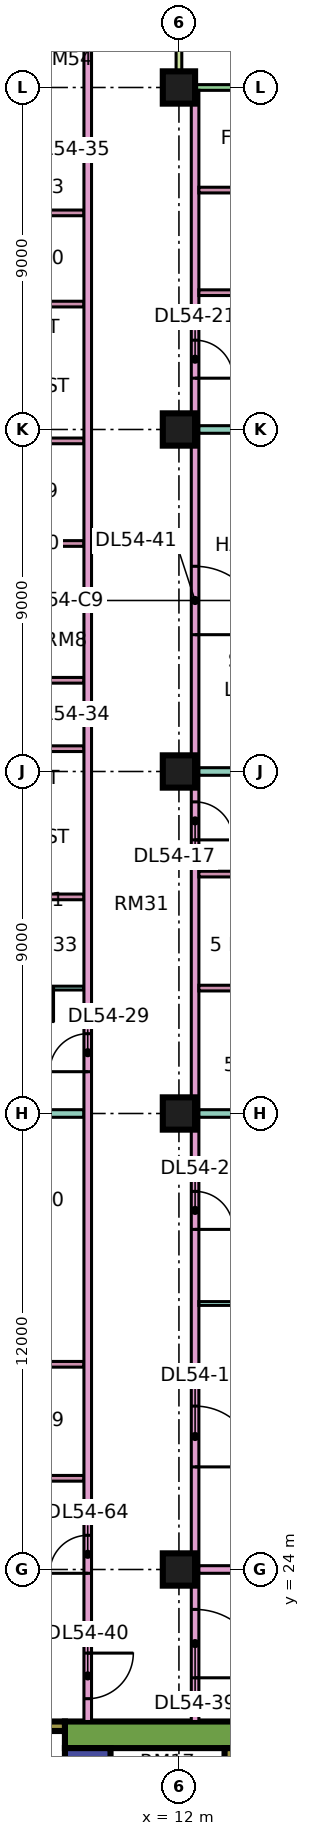
"""IFC4 building model, lengths in metres.
Left out: names, types, materials, properties, quantities, classifications, styles, units other than length and angle.
Written with IfcOpenShell. Run it as: python <this file> out.ifc"""

import sys

from ifc_helpers import new_model, si_unit, direction, frame, frame_2d, origin, origin_2d, place, context, subcontext, project, spatial, rectangle, extrude, element, fill, save


model = new_model("IFC4")
c1 = context("Model", 3, precision=1e-05, world=origin(), true_north=direction((0.0, 1.0)))
c2 = subcontext(c1, "Body", "Model", "MODEL_VIEW")
j1 = project(units=[si_unit("LENGTHUNIT", "METRE"), si_unit("PLANEANGLEUNIT", "RADIAN")], contexts=[c1])
p1 = place(None, origin())
s1 = spatial("IfcSite", under=j1, at=p1, CompositionType="ELEMENT")
p2 = place(p1, origin())
s2 = spatial("IfcBuilding", under=s1, at=p2, CompositionType="ELEMENT")
p3 = place(p2, frame((0.0, 0.0, 230.4)))
s3 = spatial("IfcBuildingStorey", under=s2, at=p3, CompositionType="ELEMENT", Elevation=230.4)
for number, where, z_axis, x_axis in (
    (1, (12.0, 24.0, 0.0), (0.0, 0.0, 1.0), (1.0, 0.0, 0.0)),
    (2, (12.0, 36.0, 0.0), (0.0, 0.0, 1.0), (1.0, 0.0, 0.0)),
    (3, (12.0, 45.0, 0.0), (0.0, 0.0, 1.0), (1.0, 0.0, 0.0)),
    (4, (12.0, 54.0, 0.0), (0.0, 0.0, 1.0), (1.0, 0.0, 0.0)),
    (5, (12.0, 63.0, 0.0), (0.0, 0.0, 1.0), (1.0, 0.0, 0.0)),
):
    element("IfcColumn", number, at=place(p3, frame(where, z_axis=z_axis, x_axis=x_axis)), inside=s3, PredefinedType="COLUMN", context=c2, shape_type="SweptSolid", body=[
        extrude(rectangle(XDim=0.85, YDim=0.85, at=origin_2d()), origin(), (0.0, 0.0, 1.0), 3.75),
    ])
p4 = place(p3, frame((9.0, 19.65, 0.0), z_axis=(0.0, 0.0, 1.0), x_axis=(1.0, 0.0, 0.0)))
e6 = element("IfcWall", 6, at=p4, inside=s3, PredefinedType="SHEAR", context=c2, shape_type="SweptSolid", body=[
    extrude(rectangle(XDim=25.0, YDim=0.7, at=frame_2d((12.5, 0.0))), origin(), (0.0, 0.0, 1.0), 3.75),
])
p5 = place(p4, frame((19.1, 0.0, 0.0)))
e7 = element("IfcOpeningElement", 7, at=p5, cuts=e6, PredefinedType="OPENING", context=c2, shape_type="SweptSolid", body=[
    extrude(rectangle(XDim=1.8, YDim=2.4, at=frame_2d((0.9, 1.2))), frame((0.0, 0.36, 0.0), z_axis=(0.0, -1.0, 0.0), x_axis=(1.0, 0.0, 0.0)), (0.0, 0.0, 1.0), 0.72),
])
p6 = place(p3, frame((9.6, 7.7, 0.0), z_axis=(0.0, 0.0, 1.0), x_axis=(0.0, 1.0, 0.0)))
e8 = element("IfcWall", 8, at=p6, inside=s3, PredefinedType="SHEAR", context=c2, shape_type="SweptSolid", body=[
    extrude(rectangle(XDim=11.6, YDim=1.2, at=frame_2d((5.8, 0.0))), origin(), (0.0, 0.0, 1.0), 3.75),
])
p7 = place(p6, frame((4.175, 0.0, 0.0)))
e9 = element("IfcOpeningElement", 9, at=p7, cuts=e8, PredefinedType="OPENING", context=c2, shape_type="SweptSolid", body=[
    extrude(rectangle(XDim=1.1, YDim=2.2, at=frame_2d((0.55, 1.1))), frame((0.0, 0.61, 0.0), z_axis=(0.0, -1.0, 0.0), x_axis=(1.0, 0.0, 0.0)), (0.0, 0.0, 1.0), 1.22),
])
p8 = place(p6, frame((6.675, 0.0, 0.0)))
e10 = element("IfcOpeningElement", 10, at=p8, cuts=e8, PredefinedType="OPENING", context=c2, shape_type="SweptSolid", body=[
    extrude(rectangle(XDim=1.1, YDim=2.2, at=frame_2d((0.55, 1.1))), frame((0.0, 0.61, 0.0), z_axis=(0.0, -1.0, 0.0), x_axis=(1.0, 0.0, 0.0)), (0.0, 0.0, 1.0), 1.22),
])
p9 = place(p6, frame((9.55, 0.0, 0.0)))
e11 = element("IfcOpeningElement", 11, at=p9, cuts=e8, PredefinedType="OPENING", context=c2, shape_type="SweptSolid", body=[
    extrude(rectangle(XDim=1.1, YDim=2.2, at=frame_2d((0.55, 1.1))), frame((0.0, 0.61, 0.0), z_axis=(0.0, -1.0, 0.0), x_axis=(1.0, 0.0, 0.0)), (0.0, 0.0, 1.0), 1.22),
])
p10 = place(p6, frame((1.85, 0.0, 0.0)))
e12 = element("IfcOpeningElement", 12, at=p10, cuts=e8, PredefinedType="OPENING", context=c2, shape_type="SweptSolid", body=[
    extrude(rectangle(XDim=0.9, YDim=2.1, at=frame_2d((0.45, 1.05))), frame((0.0, 0.61, 0.0), z_axis=(0.0, -1.0, 0.0), x_axis=(1.0, 0.0, 0.0)), (0.0, 0.0, 1.0), 1.22),
])
p11 = place(p3, frame((13.325, 7.7, 0.0), z_axis=(0.0, 0.0, 1.0), x_axis=(0.0, 1.0, 0.0)))
e13 = element("IfcWall", 13, at=p11, inside=s3, PredefinedType="SHEAR", context=c2, shape_type="SweptSolid", body=[
    extrude(rectangle(XDim=11.6, YDim=0.25, at=frame_2d((5.8, 0.0))), origin(), (0.0, 0.0, 1.0), 3.75),
])
p12 = place(p3, frame((2.1, 19.875, 0.0), z_axis=(0.0, 0.0, 1.0), x_axis=(1.0, 0.0, 0.0)))
e14 = element("IfcWall", 14, at=p12, inside=s3, PredefinedType="SHEAR", context=c2, shape_type="SweptSolid", body=[
    extrude(rectangle(XDim=6.9, YDim=0.25, at=frame_2d((3.45, 0.0))), origin(), (0.0, 0.0, 1.0), 3.75),
])
p13 = place(p12, frame((1.175, 0.0, 0.0)))
e15 = element("IfcOpeningElement", 15, at=p13, cuts=e14, PredefinedType="OPENING", context=c2, shape_type="SweptSolid", body=[
    extrude(rectangle(XDim=1.1, YDim=2.2, at=frame_2d((0.55, 1.1))), frame((0.0, 0.135, 0.0), z_axis=(0.0, -1.0, 0.0), x_axis=(1.0, 0.0, 0.0)), (0.0, 0.0, 1.0), 0.27),
])
p14 = place(p12, frame((4.6, 0.0, 0.0)))
e16 = element("IfcOpeningElement", 16, at=p14, cuts=e14, PredefinedType="OPENING", context=c2, shape_type="SweptSolid", body=[
    extrude(rectangle(XDim=1.2, YDim=2.2, at=frame_2d((0.6, 1.1))), frame((0.0, 0.135, 0.0), z_axis=(0.0, -1.0, 0.0), x_axis=(1.0, 0.0, 0.0)), (0.0, 0.0, 1.0), 0.27),
])
p15 = place(p3, frame((22.425, 63.0, 0.0), z_axis=(0.0, 0.0, 1.0), x_axis=(-1.0, 0.0, 0.0)))
e17 = element("IfcWall", 17, at=p15, inside=s3, PredefinedType="SOLIDWALL", context=c2, shape_type="SweptSolid", body=[
    extrude(rectangle(XDim=10.35, YDim=0.15, at=frame_2d((5.175, 0.0))), origin(), (0.0, 0.0, 1.0), 3.35),
])
p16 = place(p15, frame((1.4, 0.0, 0.0)))
e18 = element("IfcOpeningElement", 18, at=p16, cuts=e17, PredefinedType="OPENING", context=c2, shape_type="SweptSolid", body=[
    extrude(rectangle(XDim=1.8, YDim=2.4, at=frame_2d((0.9, 1.2))), frame((0.0, 0.085, 0.0), z_axis=(0.0, -1.0, 0.0), x_axis=(1.0, 0.0, 0.0)), (0.0, 0.0, 1.0), 0.17),
])
p17 = place(p15, frame((5.75, 0.0, 0.45)))
e19 = element("IfcOpeningElement", 19, at=p17, cuts=e17, PredefinedType="OPENING", context=c2, shape_type="SweptSolid", body=[
    extrude(rectangle(XDim=3.0, YDim=2.4, at=frame_2d((1.5, 1.2))), frame((0.0, 0.085, 0.0), z_axis=(0.0, -1.0, 0.0), x_axis=(1.0, 0.0, 0.0)), (0.0, 0.0, 1.0), 0.17),
])
p18 = place(p3, frame((12.0, 64.5, 0.0), z_axis=(0.0, 0.0, 1.0), x_axis=(0.0, -1.0, 0.0)))
e20 = element("IfcWall", 20, at=p18, inside=s3, PredefinedType="SOLIDWALL", context=c2, shape_type="SweptSolid", body=[
    extrude(rectangle(XDim=1.5, YDim=0.15, at=frame_2d((0.75, 0.0))), origin(), (0.0, 0.0, 1.0), 3.35),
])
p19 = place(p3, frame((0.0, 36.0, 0.0), z_axis=(0.0, 0.0, 1.0), x_axis=(1.0, 0.0, 0.0)))
e21 = element("IfcWall", 21, at=p19, inside=s3, PredefinedType="PARTITIONING", context=c2, shape_type="SweptSolid", body=[
    extrude(rectangle(XDim=9.5, YDim=0.2, at=frame_2d((4.75, 0.0))), origin(), (0.0, 0.0, 1.0), 3.35),
])
p20 = place(p3, frame((0.074, 22.4, 0.0), z_axis=(0.0, 0.0, 1.0), x_axis=(1.0, 0.0, 0.0)))
e22 = element("IfcWall", 22, at=p20, inside=s3, PredefinedType="PARTITIONING", context=c2, shape_type="SweptSolid", body=[
    extrude(rectangle(XDim=9.426, YDim=0.2, at=frame_2d((4.713, 0.0))), origin(), (0.0, 0.0, 1.0), 3.35),
])
for number, where, z_axis, x_axis in (
    (23, (6.975, 26.4, 0.0), (0.0, 0.0, 1.0), (1.0, 0.0, 0.0)),
    (24, (6.975, 29.4, 0.0), (0.0, 0.0, 1.0), (1.0, 0.0, 0.0)),
):
    element("IfcWall", number, at=place(p3, frame(where, z_axis=z_axis, x_axis=x_axis)), inside=s3, PredefinedType="PARTITIONING", context=c2, shape_type="SweptSolid", body=[
        extrude(rectangle(XDim=2.525, YDim=0.15, at=frame_2d((1.262, 0.0))), origin(), (0.0, 0.0, 1.0), 3.35),
    ])
p21 = place(p3, frame((6.975, 39.3, 0.0), z_axis=(0.0, 0.0, 1.0), x_axis=(1.0, 0.0, 0.0)))
e25 = element("IfcWall", 25, at=p21, inside=s3, PredefinedType="PARTITIONING", context=c2, shape_type="SweptSolid", body=[
    extrude(rectangle(XDim=2.525, YDim=0.1, at=frame_2d((1.262, 0.0))), origin(), (0.0, 0.0, 1.0), 3.35),
])
p22 = place(p21, frame((0.825, 0.0, 0.0)))
e26 = element("IfcOpeningElement", 26, at=p22, cuts=e25, PredefinedType="OPENING", context=c2, shape_type="SweptSolid", body=[
    extrude(rectangle(XDim=0.9, YDim=2.1, at=frame_2d((0.45, 1.05))), frame((0.0, 0.06, 0.0), z_axis=(0.0, -1.0, 0.0), x_axis=(1.0, 0.0, 0.0)), (0.0, 0.0, 1.0), 0.12),
])
for number, where, z_axis, x_axis in (
    (27, (6.975, 41.7, 0.0), (0.0, 0.0, 1.0), (1.0, 0.0, 0.0)),
    (28, (6.975, 45.6, 0.0), (0.0, 0.0, 1.0), (1.0, 0.0, 0.0)),
    (29, (6.975, 47.4, 0.0), (0.0, 0.0, 1.0), (1.0, 0.0, 0.0)),
    (30, (6.975, 51.0, 0.0), (0.0, 0.0, 1.0), (1.0, 0.0, 0.0)),
    (31, (6.975, 53.7, 0.0), (0.0, 0.0, 1.0), (1.0, 0.0, 0.0)),
    (32, (6.975, 57.3, 0.0), (0.0, 0.0, 1.0), (1.0, 0.0, 0.0)),
    (33, (6.975, 59.7, 0.0), (0.0, 0.0, 1.0), (1.0, 0.0, 0.0)),
):
    element("IfcWall", number, at=place(p3, frame(where, z_axis=z_axis, x_axis=x_axis)), inside=s3, PredefinedType="PARTITIONING", context=c2, shape_type="SweptSolid", body=[
        extrude(rectangle(XDim=2.525, YDim=0.15, at=frame_2d((1.262, 0.0))), origin(), (0.0, 0.0, 1.0), 3.35),
    ])
p23 = place(p3, frame((9.6, 20.0, 0.0), z_axis=(0.0, 0.0, 1.0), x_axis=(0.0, 1.0, 0.0)))
e34 = element("IfcWall", 34, at=p23, inside=s3, PredefinedType="PARTITIONING", context=c2, shape_type="SweptSolid", body=[
    extrude(rectangle(XDim=44.35, YDim=0.2, at=frame_2d((22.175, 0.0))), origin(), (0.0, 0.0, 1.0), 3.35),
])
p24 = place(p23, frame((17.1, 0.0, 0.0)))
e35 = element("IfcOpeningElement", 35, at=p24, cuts=e34, PredefinedType="OPENING", context=c2, shape_type="SweptSolid", body=[
    extrude(rectangle(XDim=1.0, YDim=2.1, at=frame_2d((0.5, 1.05))), frame((0.0, 0.11, 0.0), z_axis=(0.0, -1.0, 0.0), x_axis=(1.0, 0.0, 0.0)), (0.0, 0.0, 1.0), 0.22),
])
p25 = place(p23, frame((0.6, 0.0, 0.0)))
e36 = element("IfcOpeningElement", 36, at=p25, cuts=e34, PredefinedType="OPENING", context=c2, shape_type="SweptSolid", body=[
    extrude(rectangle(XDim=1.2, YDim=2.1, at=frame_2d((0.6, 1.05))), frame((0.0, 0.11, 0.0), z_axis=(0.0, -1.0, 0.0), x_axis=(1.0, 0.0, 0.0)), (0.0, 0.0, 1.0), 0.22),
])
p26 = place(p23, frame((3.9, 0.0, 0.0)))
e37 = element("IfcOpeningElement", 37, at=p26, cuts=e34, PredefinedType="OPENING", context=c2, shape_type="SweptSolid", body=[
    extrude(rectangle(XDim=1.0, YDim=2.1, at=frame_2d((0.5, 1.05))), frame((0.0, 0.11, 0.0), z_axis=(0.0, -1.0, 0.0), x_axis=(1.0, 0.0, 0.0)), (0.0, 0.0, 1.0), 0.22),
])
p27 = place(p3, frame((12.425, 20.0, 0.0), z_axis=(0.0, 0.0, 1.0), x_axis=(0.0, 1.0, 0.0)))
e38 = element("IfcWall", 38, at=p27, inside=s3, PredefinedType="PARTITIONING", context=c2, shape_type="SweptSolid", body=[
    extrude(rectangle(XDim=42.926, YDim=0.2, at=frame_2d((21.463, 0.0))), origin(), (0.0, 0.0, 1.0), 3.35),
])
p28 = place(p27, frame((6.7, 0.0, 0.0)))
e39 = element("IfcOpeningElement", 39, at=p28, cuts=e38, PredefinedType="OPENING", context=c2, shape_type="SweptSolid", body=[
    extrude(rectangle(XDim=1.6, YDim=2.1, at=frame_2d((0.8, 1.05))), frame((0.0, 0.11, 0.0), z_axis=(0.0, -1.0, 0.0), x_axis=(1.0, 0.0, 0.0)), (0.0, 0.0, 1.0), 0.22),
])
p29 = place(p27, frame((12.95, 0.0, 0.0)))
e40 = element("IfcOpeningElement", 40, at=p29, cuts=e38, PredefinedType="OPENING", context=c2, shape_type="SweptSolid", body=[
    extrude(rectangle(XDim=1.0, YDim=2.1, at=frame_2d((0.5, 1.05))), frame((0.0, 0.11, 0.0), z_axis=(0.0, -1.0, 0.0), x_axis=(1.0, 0.0, 0.0)), (0.0, 0.0, 1.0), 0.22),
])
p30 = place(p27, frame((23.2, 0.0, 0.0)))
e41 = element("IfcOpeningElement", 41, at=p30, cuts=e38, PredefinedType="OPENING", context=c2, shape_type="SweptSolid", body=[
    extrude(rectangle(XDim=1.0, YDim=2.1, at=frame_2d((0.5, 1.05))), frame((0.0, 0.11, 0.0), z_axis=(0.0, -1.0, 0.0), x_axis=(1.0, 0.0, 0.0)), (0.0, 0.0, 1.0), 0.22),
])
p31 = place(p27, frame((35.35, 0.0, 0.0)))
e42 = element("IfcOpeningElement", 42, at=p31, cuts=e38, PredefinedType="OPENING", context=c2, shape_type="SweptSolid", body=[
    extrude(rectangle(XDim=1.0, YDim=2.1, at=frame_2d((0.5, 1.05))), frame((0.0, 0.11, 0.0), z_axis=(0.0, -1.0, 0.0), x_axis=(1.0, 0.0, 0.0)), (0.0, 0.0, 1.0), 0.22),
])
p32 = place(p27, frame((1.15, 0.0, 0.0)))
e43 = element("IfcOpeningElement", 43, at=p32, cuts=e38, PredefinedType="OPENING", context=c2, shape_type="SweptSolid", body=[
    extrude(rectangle(XDim=1.8, YDim=2.1, at=frame_2d((0.9, 1.05))), frame((0.0, 0.11, 0.0), z_axis=(0.0, -1.0, 0.0), x_axis=(1.0, 0.0, 0.0)), (0.0, 0.0, 1.0), 0.22),
])
p33 = place(p27, frame((28.6, 0.0, 0.0)))
e44 = element("IfcOpeningElement", 44, at=p33, cuts=e38, PredefinedType="OPENING", context=c2, shape_type="SweptSolid", body=[
    extrude(rectangle(XDim=1.8, YDim=2.1, at=frame_2d((0.9, 1.05))), frame((0.0, 0.11, 0.0), z_axis=(0.0, -1.0, 0.0), x_axis=(1.0, 0.0, 0.0)), (0.0, 0.0, 1.0), 0.22),
])
p34 = place(p3, frame((12.525, 24.0, 0.0), z_axis=(0.0, 0.0, 1.0), x_axis=(1.0, 0.0, 0.0)))
e45 = element("IfcWall", 45, at=p34, inside=s3, PredefinedType="PARTITIONING", context=c2, shape_type="SweptSolid", body=[
    extrude(rectangle(XDim=8.975, YDim=0.2, at=frame_2d((4.488, 0.0))), origin(), (0.0, 0.0, 1.0), 3.35),
])
p35 = place(p3, frame((12.525, 31.0, 0.0), z_axis=(0.0, 0.0, 1.0), x_axis=(1.0, 0.0, 0.0)))
e46 = element("IfcWall", 46, at=p35, inside=s3, PredefinedType="PARTITIONING", context=c2, shape_type="SweptSolid", body=[
    extrude(rectangle(XDim=8.975, YDim=0.1, at=frame_2d((4.488, 0.0))), origin(), (0.0, 0.0, 1.0), 3.35),
])
p36 = place(p3, frame((12.525, 36.0, 0.0), z_axis=(0.0, 0.0, 1.0), x_axis=(1.0, 0.0, 0.0)))
e47 = element("IfcWall", 47, at=p36, inside=s3, PredefinedType="PARTITIONING", context=c2, shape_type="SweptSolid", body=[
    extrude(rectangle(XDim=11.475, YDim=0.2, at=frame_2d((5.738, 0.0))), origin(), (0.0, 0.0, 1.0), 3.35),
])
p37 = place(p3, frame((12.525, 39.3, 0.0), z_axis=(0.0, 0.0, 1.0), x_axis=(1.0, 0.0, 0.0)))
e48 = element("IfcWall", 48, at=p37, inside=s3, PredefinedType="PARTITIONING", context=c2, shape_type="SweptSolid", body=[
    extrude(rectangle(XDim=4.025, YDim=0.15, at=frame_2d((2.013, 0.0))), origin(), (0.0, 0.0, 1.0), 3.35),
])
p38 = place(p3, frame((12.525, 42.3, 0.0), z_axis=(0.0, 0.0, 1.0), x_axis=(1.0, 0.0, 0.0)))
e49 = element("IfcWall", 49, at=p38, inside=s3, PredefinedType="PARTITIONING", context=c2, shape_type="SweptSolid", body=[
    extrude(rectangle(XDim=4.025, YDim=0.15, at=frame_2d((2.013, 0.0))), origin(), (0.0, 0.0, 1.0), 3.35),
])
p39 = place(p38, frame((1.55, 0.0, 0.0)))
e50 = element("IfcOpeningElement", 50, at=p39, cuts=e49, PredefinedType="OPENING", context=c2, shape_type="SweptSolid", body=[
    extrude(rectangle(XDim=0.8, YDim=2.1, at=frame_2d((0.4, 1.05))), frame((0.0, 0.085, 0.0), z_axis=(0.0, -1.0, 0.0), x_axis=(1.0, 0.0, 0.0)), (0.0, 0.0, 1.0), 0.17),
])
p40 = place(p3, frame((12.525, 45.0, 0.0), z_axis=(0.0, 0.0, 1.0), x_axis=(1.0, 0.0, 0.0)))
e51 = element("IfcWall", 51, at=p40, inside=s3, PredefinedType="PARTITIONING", context=c2, shape_type="SweptSolid", body=[
    extrude(rectangle(XDim=11.401, YDim=0.2, at=frame_2d((5.701, 0.0))), origin(), (0.0, 0.0, 1.0), 3.35),
])
p41 = place(p3, frame((12.525, 54.0, 0.0), z_axis=(0.0, 0.0, 1.0), x_axis=(1.0, 0.0, 0.0)))
e52 = element("IfcWall", 52, at=p41, inside=s3, PredefinedType="PARTITIONING", context=c2, shape_type="SweptSolid", body=[
    extrude(rectangle(XDim=11.475, YDim=0.2, at=frame_2d((5.738, 0.0))), origin(), (0.0, 0.0, 1.0), 3.35),
])
p42 = place(p3, frame((12.525, 57.6, 0.0), z_axis=(0.0, 0.0, 1.0), x_axis=(1.0, 0.0, 0.0)))
e53 = element("IfcWall", 53, at=p42, inside=s3, PredefinedType="PARTITIONING", context=c2, shape_type="SweptSolid", body=[
    extrude(rectangle(XDim=5.375, YDim=0.15, at=frame_2d((2.688, 0.0))), origin(), (0.0, 0.0, 1.0), 3.35),
])
p43 = place(p3, frame((12.525, 60.3, 0.0), z_axis=(0.0, 0.0, 1.0), x_axis=(1.0, 0.0, 0.0)))
e54 = element("IfcWall", 54, at=p43, inside=s3, PredefinedType="PARTITIONING", context=c2, shape_type="SweptSolid", body=[
    extrude(rectangle(XDim=5.225, YDim=0.15, at=frame_2d((2.613, 0.0))), origin(), (0.0, 0.0, 1.0), 3.35),
])
p44 = place(p28, frame((1.6, 0.0, 0.0), z_axis=(0.0, 0.0, 1.0), x_axis=(-1.0, 0.0, 0.0)))
e55 = element("IfcDoor", 55, at=p44, inside=s3, OperationType="DOUBLE_DOOR_SINGLE_SWING", PredefinedType="DOOR", context=c2, shape_type="SweptSolid", body=[
    extrude(rectangle(XDim=1.6, YDim=2.1, at=frame_2d((0.8, 1.05))), frame((0.0, 0.025, 0.0), z_axis=(0.0, -1.0, 0.0), x_axis=(1.0, 0.0, 0.0)), (0.0, 0.0, 1.0), 0.05),
])
fill(e39, e55)
p45 = place(p29, frame((1.0, 0.0, 0.0), z_axis=(0.0, 0.0, 1.0), x_axis=(-1.0, 0.0, 0.0)))
e56 = element("IfcDoor", 56, at=p45, inside=s3, OperationType="SINGLE_SWING_LEFT", PredefinedType="DOOR", context=c2, shape_type="SweptSolid", body=[
    extrude(rectangle(XDim=1.0, YDim=2.1, at=frame_2d((0.5, 1.05))), frame((0.0, 0.025, 0.0), z_axis=(0.0, -1.0, 0.0), x_axis=(1.0, 0.0, 0.0)), (0.0, 0.0, 1.0), 0.05),
])
fill(e40, e56)
p46 = place(p30, frame((1.0, 0.0, 0.0), z_axis=(0.0, 0.0, 1.0), x_axis=(-1.0, 0.0, 0.0)))
e57 = element("IfcDoor", 57, at=p46, inside=s3, OperationType="SINGLE_SWING_LEFT", PredefinedType="DOOR", context=c2, shape_type="SweptSolid", body=[
    extrude(rectangle(XDim=1.0, YDim=2.1, at=frame_2d((0.5, 1.05))), frame((0.0, 0.025, 0.0), z_axis=(0.0, -1.0, 0.0), x_axis=(1.0, 0.0, 0.0)), (0.0, 0.0, 1.0), 0.05),
])
fill(e41, e57)
p47 = place(p31, frame((1.0, 0.0, 0.0), z_axis=(0.0, 0.0, 1.0), x_axis=(-1.0, 0.0, 0.0)))
e58 = element("IfcDoor", 58, at=p47, inside=s3, OperationType="SINGLE_SWING_LEFT", PredefinedType="DOOR", context=c2, shape_type="SweptSolid", body=[
    extrude(rectangle(XDim=1.0, YDim=2.1, at=frame_2d((0.5, 1.05))), frame((0.0, 0.025, 0.0), z_axis=(0.0, -1.0, 0.0), x_axis=(1.0, 0.0, 0.0)), (0.0, 0.0, 1.0), 0.05),
])
fill(e42, e58)
p48 = place(p24, origin())
e59 = element("IfcDoor", 59, at=p48, inside=s3, OperationType="SINGLE_SWING_LEFT", PredefinedType="DOOR", context=c2, shape_type="SweptSolid", body=[
    extrude(rectangle(XDim=1.0, YDim=2.1, at=frame_2d((0.5, 1.05))), frame((0.0, 0.025, 0.0), z_axis=(0.0, -1.0, 0.0), x_axis=(1.0, 0.0, 0.0)), (0.0, 0.0, 1.0), 0.05),
])
fill(e35, e59)
p49 = place(p22, origin())
e60 = element("IfcDoor", 60, at=p49, inside=s3, OperationType="SINGLE_SWING_RIGHT", PredefinedType="DOOR", context=c2, shape_type="SweptSolid", body=[
    extrude(rectangle(XDim=0.9, YDim=2.1, at=frame_2d((0.45, 1.05))), frame((0.0, 0.025, 0.0), z_axis=(0.0, -1.0, 0.0), x_axis=(1.0, 0.0, 0.0)), (0.0, 0.0, 1.0), 0.05),
])
fill(e26, e60)
p50 = place(p32, frame((1.8, 0.0, 0.0), z_axis=(0.0, 0.0, 1.0), x_axis=(-1.0, 0.0, 0.0)))
e61 = element("IfcDoor", 61, at=p50, inside=s3, OperationType="DOUBLE_DOOR_SINGLE_SWING", PredefinedType="DOOR", context=c2, shape_type="SweptSolid", body=[
    extrude(rectangle(XDim=1.8, YDim=2.1, at=frame_2d((0.9, 1.05))), frame((0.0, 0.025, 0.0), z_axis=(0.0, -1.0, 0.0), x_axis=(1.0, 0.0, 0.0)), (0.0, 0.0, 1.0), 0.05),
])
fill(e43, e61)
p51 = place(p25, origin())
e62 = element("IfcDoor", 62, at=p51, inside=s3, OperationType="SINGLE_SWING_RIGHT", PredefinedType="DOOR", context=c2, shape_type="SweptSolid", body=[
    extrude(rectangle(XDim=1.2, YDim=2.1, at=frame_2d((0.6, 1.05))), frame((0.0, 0.025, 0.0), z_axis=(0.0, -1.0, 0.0), x_axis=(1.0, 0.0, 0.0)), (0.0, 0.0, 1.0), 0.05),
])
fill(e36, e62)
p52 = place(p33, frame((1.8, 0.0, 0.0), z_axis=(0.0, 0.0, 1.0), x_axis=(-1.0, 0.0, 0.0)))
e63 = element("IfcDoor", 63, at=p52, inside=s3, OperationType="DOUBLE_DOOR_SINGLE_SWING", PredefinedType="DOOR", context=c2, shape_type="SweptSolid", body=[
    extrude(rectangle(XDim=1.8, YDim=2.1, at=frame_2d((0.9, 1.05))), frame((0.0, 0.025, 0.0), z_axis=(0.0, -1.0, 0.0), x_axis=(1.0, 0.0, 0.0)), (0.0, 0.0, 1.0), 0.05),
])
fill(e44, e63)
p53 = place(p26, origin())
e64 = element("IfcDoor", 64, at=p53, inside=s3, OperationType="SINGLE_SWING_LEFT", PredefinedType="DOOR", context=c2, shape_type="SweptSolid", body=[
    extrude(rectangle(XDim=1.0, YDim=2.1, at=frame_2d((0.5, 1.05))), frame((0.0, 0.025, 0.0), z_axis=(0.0, -1.0, 0.0), x_axis=(1.0, 0.0, 0.0)), (0.0, 0.0, 1.0), 0.05),
])
fill(e37, e64)
save(model, sys.argv[1])
